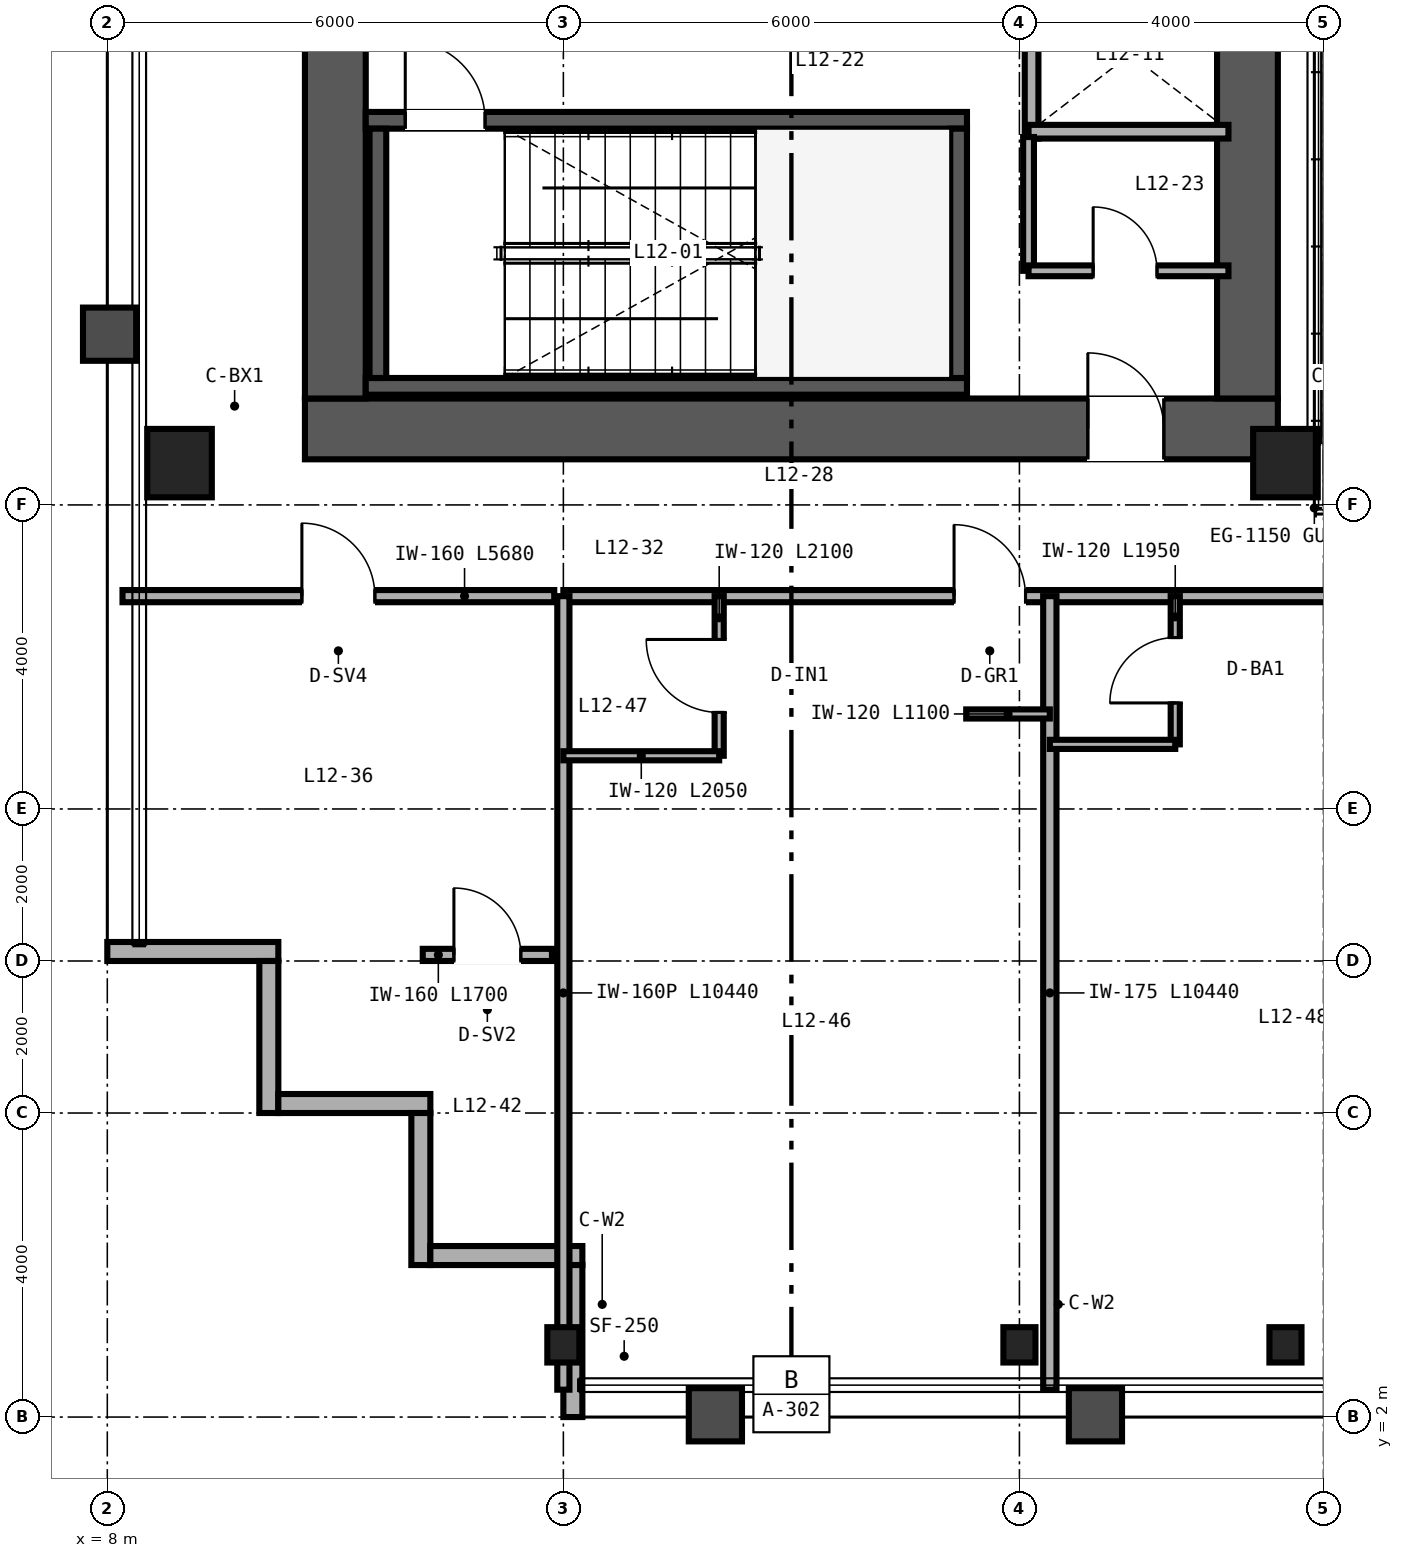
"""IFC4 building model, lengths in metres.
Left out: names, types, materials, properties, quantities, classifications, styles, units other than length and angle.
Written with IfcOpenShell. Run it as: python <this file> out.ifc"""

import sys

from ifc_helpers import new_model, si_unit, direction, frame, frame_2d, origin, origin_2d, place, context, subcontext, project, spatial, rectangle, hollow_rectangle, i_section, extrude, source, transform, mapped, element, fill, save


model = new_model("IFC4")
c1 = context("Model", 3, precision=1e-05, world=origin(), true_north=direction((0.0, 1.0)))
c2 = subcontext(c1, "Body", "Model", "MODEL_VIEW")
j1 = project(units=[si_unit("LENGTHUNIT", "METRE"), si_unit("PLANEANGLEUNIT", "RADIAN")], contexts=[c1])
p1 = place(None, origin())
s1 = spatial("IfcSite", under=j1, at=p1, CompositionType="ELEMENT")
p2 = place(p1, origin())
s2 = spatial("IfcBuilding", under=s1, at=p2, CompositionType="ELEMENT")
p3 = place(p2, frame((0.0, 0.0, 52.8)))
s3 = spatial("IfcBuildingStorey", under=s2, at=p3, CompositionType="ELEMENT", Elevation=52.8)
p4 = place(p3, frame((10.6, 15.0, 0.0), z_axis=(0.0, 0.0, 1.0), x_axis=(1.0, 0.0, 0.0)))
e1 = element("IfcWall", 1, at=p4, inside=s3, PredefinedType="SHEAR", context=c2, shape_type="SweptSolid", body=[
    extrude(rectangle(XDim=12.8, YDim=0.8, at=frame_2d((6.4, 0.0))), origin(), (0.0, 0.0, 1.0), 3.35),
])
p5 = place(p4, frame((10.3, 0.0, 0.0)))
e2 = element("IfcOpeningElement", 2, at=p5, cuts=e1, PredefinedType="OPENING", context=c2, shape_type="SweptSolid", body=[
    extrude(rectangle(XDim=1.0, YDim=2.15, at=frame_2d((0.5, 1.075))), frame((0.0, 0.41, 0.0), z_axis=(0.0, -1.0, 0.0), x_axis=(1.0, 0.0, 0.0)), (0.0, 0.0, 1.0), 0.82),
])
for number, where, z_axis, x_axis in (
    (3, (11.0, 15.4, 0.0), (0.0, 0.0, 1.0), (0.0, 1.0, 0.0)),
    (4, (23.0, 15.4, 0.0), (0.0, 0.0, 1.0), (0.0, 1.0, 0.0)),
):
    element("IfcWall", number, at=place(p3, frame(where, z_axis=z_axis, x_axis=x_axis)), inside=s3, PredefinedType="SHEAR", context=c2, shape_type="SweptSolid", body=[
        extrude(rectangle(XDim=21.2, YDim=0.8, at=frame_2d((10.6, 0.0))), origin(), (0.0, 0.0, 1.0), 3.35),
    ])
p6 = place(p3, frame((11.4, 15.56, 0.0), z_axis=(0.0, 0.0, 1.0), x_axis=(1.0, 0.0, 0.0)))
e5 = element("IfcWall", 5, at=p6, inside=s3, PredefinedType="SHEAR", context=c2, shape_type="SweptSolid", body=[
    extrude(rectangle(XDim=7.91, YDim=0.22, at=frame_2d((3.955, 0.0))), origin(), (0.0, 0.0, 1.0), 3.4),
])
p7 = place(p3, frame((11.4, 19.06, 0.0), z_axis=(0.0, 0.0, 1.0), x_axis=(1.0, 0.0, 0.0)))
e6 = element("IfcWall", 6, at=p7, inside=s3, PredefinedType="SHEAR", context=c2, shape_type="SweptSolid", body=[
    extrude(rectangle(XDim=7.91, YDim=0.22, at=frame_2d((3.955, 0.0))), origin(), (0.0, 0.0, 1.0), 3.4),
])
p8 = place(p7, frame((0.52, 0.0, 0.0)))
e7 = element("IfcOpeningElement", 7, at=p8, cuts=e6, PredefinedType="OPENING", context=c2, shape_type="SweptSolid", body=[
    extrude(rectangle(XDim=1.05, YDim=2.15, at=frame_2d((0.525, 1.075))), frame((0.0, 0.12, 0.0), z_axis=(0.0, -1.0, 0.0), x_axis=(1.0, 0.0, 0.0)), (0.0, 0.0, 1.0), 0.24),
])
for number, where, z_axis, x_axis in (
    (8, (11.56, 15.67, 0.0), (0.0, 0.0, 1.0), (0.0, 1.0, 0.0)),
    (9, (19.2, 15.67, 0.0), (0.0, 0.0, 1.0), (0.0, 1.0, 0.0)),
):
    element("IfcWall", number, at=place(p3, frame(where, z_axis=z_axis, x_axis=x_axis)), inside=s3, PredefinedType="SHEAR", context=c2, shape_type="SweptSolid", body=[
        extrude(rectangle(XDim=3.28, YDim=0.22, at=frame_2d((1.64, 0.0))), origin(), (0.0, 0.0, 1.0), 3.4),
    ])
m1 = source(origin(), c2, "Body", "SweptSolid", [
    extrude(hollow_rectangle(XDim=0.85, YDim=0.9, WallThickness=0.04, at=origin_2d()), origin(), (0.0, 0.0, 1.0), 3.35),
])
for number, where, z_axis, x_axis in (
    (10, (8.95, 14.55, 0.0), (0.0, 0.0, 1.0), (1.0, 0.0, 0.0)),
    (11, (23.5, 14.55, 0.0), (0.0, 0.0, 1.0), (1.0, 0.0, 0.0)),
):
    element("IfcColumn", number, at=place(p3, frame(where, z_axis=z_axis, x_axis=x_axis)), inside=s3, PredefinedType="COLUMN", context=c2, shape_type="MappedRepresentation", body=[
        mapped(m1, transform((0.0, 0.0, 0.0), scale=1.0)),
    ])
m2 = source(origin(), c2, "Body", "SweptSolid", [
    extrude(i_section(OverallWidth=0.422, OverallDepth=0.465, WebThickness=0.045, FlangeThickness=0.073, FilletRadius=0.025, at=origin_2d()), origin(), (0.0, 0.0, 1.0), 3.35),
])
for number, where, z_axis, x_axis in (
    (12, (14.0, 2.95, 0.0), (0.0, 0.0, 1.0), (1.0, 0.0, 0.0)),
    (13, (20.0, 2.95, 0.0), (0.0, 0.0, 1.0), (1.0, 0.0, 0.0)),
    (14, (23.5, 2.95, 0.0), (0.0, 0.0, 1.0), (1.0, 0.0, 0.0)),
):
    element("IfcColumn", number, at=place(p3, frame(where, z_axis=z_axis, x_axis=x_axis)), inside=s3, PredefinedType="COLUMN", context=c2, shape_type="MappedRepresentation", body=[
        mapped(m2, transform((0.0, 0.0, 0.0), scale=1.0)),
    ])
p9 = place(p3, frame((8.0, 8.125, 0.0), z_axis=(0.0, 0.0, 1.0), x_axis=(1.0, 0.0, 0.0)))
e15 = element("IfcWall", 15, at=p9, inside=s3, PredefinedType="SOLIDWALL", context=c2, shape_type="SweptSolid", body=[
    extrude(rectangle(XDim=2.25, YDim=0.25, at=frame_2d((1.125, 0.0))), origin(), (0.0, 0.0, 1.0), 3.35),
])
for number, where, z_axis, x_axis in (
    (16, (10.125, 8.0, 0.0), (0.0, 0.0, 1.0), (0.0, -1.0, 0.0)),
    (17, (10.25, 6.125, 0.0), (0.0, 0.0, 1.0), (1.0, 0.0, 0.0)),
    (18, (12.125, 6.0, 0.0), (0.0, 0.0, 1.0), (0.0, -1.0, 0.0)),
    (19, (12.25, 4.125, 0.0), (0.0, 0.0, 1.0), (1.0, 0.0, 0.0)),
):
    element("IfcWall", number, at=place(p3, frame(where, z_axis=z_axis, x_axis=x_axis)), inside=s3, PredefinedType="SOLIDWALL", context=c2, shape_type="SweptSolid", body=[
        extrude(rectangle(XDim=2.0, YDim=0.25, at=frame_2d((1.0, 0.0))), origin(), (0.0, 0.0, 1.0), 3.35),
    ])
p10 = place(p3, frame((14.125, 4.0, 0.0), z_axis=(0.0, 0.0, 1.0), x_axis=(0.0, -1.0, 0.0)))
e20 = element("IfcWall", 20, at=p10, inside=s3, PredefinedType="SOLIDWALL", context=c2, shape_type="SweptSolid", body=[
    extrude(rectangle(XDim=2.0, YDim=0.25, at=frame_2d((1.0, 0.0))), origin(), (0.0, 0.0, 1.0), 2.657),
])
p11 = place(p3, frame((20.16, 18.82, 0.0), z_axis=(0.0, 0.0, 1.0), x_axis=(0.0, 1.0, 0.0)))
e21 = element("IfcWall", 21, at=p11, inside=s3, PredefinedType="SOLIDWALL", context=c2, shape_type="SweptSolid", body=[
    extrude(rectangle(XDim=6.32, YDim=0.18, at=frame_2d((3.16, 0.0))), origin(), (0.0, 0.0, 1.0), 2.36),
])
p12 = place(p3, frame((20.12, 18.91, 0.0), z_axis=(0.0, 0.0, 1.0), x_axis=(1.0, 0.0, 0.0)))
e22 = element("IfcWall", 22, at=p12, inside=s3, PredefinedType="SOLIDWALL", context=c2, shape_type="SweptSolid", body=[
    extrude(rectangle(XDim=2.63, YDim=0.18, at=frame_2d((1.315, 0.0))), origin(), (0.0, 0.0, 1.0), 3.35),
])
p13 = place(p3, frame((20.12, 17.08, 0.0), z_axis=(0.0, 0.0, 1.0), x_axis=(0.0, 1.0, 0.0)))
e23 = element("IfcWall", 23, at=p13, inside=s3, PredefinedType="PARTITIONING", context=c2, shape_type="SweptSolid", body=[
    extrude(rectangle(XDim=1.76, YDim=0.142, at=frame_2d((0.88, 0.0))), origin(), (0.0, 0.0, 1.0), 3.35),
])
p14 = place(p3, frame((20.12, 17.08, 0.0), z_axis=(0.0, 0.0, 1.0), x_axis=(1.0, 0.0, 0.0)))
e24 = element("IfcWall", 24, at=p14, inside=s3, PredefinedType="PARTITIONING", context=c2, shape_type="SweptSolid", body=[
    extrude(rectangle(XDim=2.63, YDim=0.142, at=frame_2d((1.315, 0.0))), origin(), (0.0, 0.0, 1.0), 3.35),
])
p15 = place(p14, frame((0.85, 0.0, 0.0)))
e25 = element("IfcOpeningElement", 25, at=p15, cuts=e24, PredefinedType="OPENING", context=c2, shape_type="SweptSolid", body=[
    extrude(rectangle(XDim=0.84, YDim=2.1, at=frame_2d((0.42, 1.05))), frame((0.0, 0.081, 0.0), z_axis=(0.0, -1.0, 0.0), x_axis=(1.0, 0.0, 0.0)), (0.0, 0.0, 1.0), 0.162),
])
p16 = place(p3, frame((8.2, 12.8, 0.0), z_axis=(0.0, 0.0, 1.0), x_axis=(1.0, 0.0, 0.0)))
e26 = element("IfcWall", 26, at=p16, inside=s3, PredefinedType="PARTITIONING", context=c2, shape_type="SweptSolid", body=[
    extrude(rectangle(XDim=5.68, YDim=0.16, at=frame_2d((2.84, 0.0))), origin(), (0.0, 0.0, 1.0), 3.35),
])
p17 = place(p16, frame((2.36, 0.0, 0.0)))
e27 = element("IfcOpeningElement", 27, at=p17, cuts=e26, PredefinedType="OPENING", context=c2, shape_type="SweptSolid", body=[
    extrude(rectangle(XDim=0.96, YDim=2.15, at=frame_2d((0.48, 1.075))), frame((0.0, 0.09, 0.0), z_axis=(0.0, -1.0, 0.0), x_axis=(1.0, 0.0, 0.0)), (0.0, 0.0, 1.0), 0.18),
])
p18 = place(p3, frame((12.15, 8.08, 0.0), z_axis=(0.0, 0.0, 1.0), x_axis=(1.0, 0.0, 0.0)))
e28 = element("IfcWall", 28, at=p18, inside=s3, PredefinedType="PARTITIONING", context=c2, shape_type="SweptSolid", body=[
    extrude(rectangle(XDim=1.7, YDim=0.16, at=frame_2d((0.85, 0.0))), origin(), (0.0, 0.0, 1.0), 3.35),
])
p19 = place(p18, frame((0.41, 0.0, 0.0)))
e29 = element("IfcOpeningElement", 29, at=p19, cuts=e28, PredefinedType="OPENING", context=c2, shape_type="SweptSolid", body=[
    extrude(rectangle(XDim=0.88, YDim=2.15, at=frame_2d((0.44, 1.075))), frame((0.0, 0.09, 0.0), z_axis=(0.0, -1.0, 0.0), x_axis=(1.0, 0.0, 0.0)), (0.0, 0.0, 1.0), 0.18),
])
p20 = place(p3, frame((14.0, 12.8, 0.0), z_axis=(0.0, 0.0, 1.0), x_axis=(1.0, 0.0, 0.0)))
e30 = element("IfcWall", 30, at=p20, inside=s3, PredefinedType="PARTITIONING", context=c2, shape_type="SweptSolid", body=[
    extrude(rectangle(XDim=36.0, YDim=0.16, at=frame_2d((18.0, 0.0))), origin(), (0.0, 0.0, 1.0), 2.571),
])
p21 = place(p20, frame((5.14, 0.0, 0.0)))
e31 = element("IfcOpeningElement", 31, at=p21, cuts=e30, PredefinedType="OPENING", context=c2, shape_type="SweptSolid", body=[
    extrude(rectangle(XDim=0.94, YDim=2.15, at=frame_2d((0.47, 1.075))), frame((0.0, 0.09, 0.0), z_axis=(0.0, -1.0, 0.0), x_axis=(1.0, 0.0, 0.0)), (0.0, 0.0, 1.0), 0.18),
])
p22 = place(p20, frame((11.34, 0.0, 0.0)))
e32 = element("IfcOpeningElement", 32, at=p22, cuts=e30, PredefinedType="OPENING", context=c2, shape_type="SweptSolid", body=[
    extrude(rectangle(XDim=0.94, YDim=2.15, at=frame_2d((0.47, 1.075))), frame((0.0, 0.09, 0.0), z_axis=(0.0, -1.0, 0.0), x_axis=(1.0, 0.0, 0.0)), (0.0, 0.0, 1.0), 0.18),
])
p23 = place(p20, frame((17.94, 0.0, 0.0)))
e33 = element("IfcOpeningElement", 33, at=p23, cuts=e30, PredefinedType="OPENING", context=c2, shape_type="SweptSolid", body=[
    extrude(rectangle(XDim=0.94, YDim=2.15, at=frame_2d((0.47, 1.075))), frame((0.0, 0.09, 0.0), z_axis=(0.0, -1.0, 0.0), x_axis=(1.0, 0.0, 0.0)), (0.0, 0.0, 1.0), 0.18),
])
p24 = place(p20, frame((21.82, 0.0, 0.0)))
e34 = element("IfcOpeningElement", 34, at=p24, cuts=e30, PredefinedType="OPENING", context=c2, shape_type="SweptSolid", body=[
    extrude(rectangle(XDim=0.96, YDim=2.15, at=frame_2d((0.48, 1.075))), frame((0.0, 0.09, 0.0), z_axis=(0.0, -1.0, 0.0), x_axis=(1.0, 0.0, 0.0)), (0.0, 0.0, 1.0), 0.18),
])
p25 = place(p20, frame((29.54, 0.0, 0.0)))
e35 = element("IfcOpeningElement", 35, at=p25, cuts=e30, PredefinedType="OPENING", context=c2, shape_type="SweptSolid", body=[
    extrude(rectangle(XDim=0.94, YDim=2.15, at=frame_2d((0.47, 1.075))), frame((0.0, 0.09, 0.0), z_axis=(0.0, -1.0, 0.0), x_axis=(1.0, 0.0, 0.0)), (0.0, 0.0, 1.0), 0.18),
])
p26 = place(p20, frame((32.92, 0.0, 0.0)))
e36 = element("IfcOpeningElement", 36, at=p26, cuts=e30, PredefinedType="OPENING", context=c2, shape_type="SweptSolid", body=[
    extrude(rectangle(XDim=0.96, YDim=2.15, at=frame_2d((0.48, 1.075))), frame((0.0, 0.09, 0.0), z_axis=(0.0, -1.0, 0.0), x_axis=(1.0, 0.0, 0.0)), (0.0, 0.0, 1.0), 0.18),
])
p27 = place(p3, frame((14.0, 2.36, 0.0), z_axis=(0.0, 0.0, 1.0), x_axis=(0.0, 1.0, 0.0)))
e37 = element("IfcWall", 37, at=p27, inside=s3, PredefinedType="PARTITIONING", context=c2, shape_type="SweptSolid", body=[
    extrude(rectangle(XDim=10.44, YDim=0.16, at=frame_2d((5.22, 0.0))), origin(), (0.0, 0.0, 1.0), 2.657),
])
p28 = place(p3, frame((20.4, 2.36, 0.0), z_axis=(0.0, 0.0, 1.0), x_axis=(0.0, 1.0, 0.0)))
e38 = element("IfcWall", 38, at=p28, inside=s3, PredefinedType="PARTITIONING", context=c2, shape_type="SweptSolid", body=[
    extrude(rectangle(XDim=10.44, YDim=0.175, at=frame_2d((5.22, 0.0))), origin(), (0.0, 0.0, 1.0), 2.813),
])
p29 = place(p3, frame((16.05, 10.7, 0.0), z_axis=(0.0, 0.0, 1.0), x_axis=(0.0, 1.0, 0.0)))
e39 = element("IfcWall", 39, at=p29, inside=s3, PredefinedType="PARTITIONING", context=c2, shape_type="SweptSolid", body=[
    extrude(rectangle(XDim=2.1, YDim=0.12, at=frame_2d((1.05, 0.0))), origin(), (0.0, 0.0, 1.0), 3.35),
])
p30 = place(p29, frame((0.57, 0.0, 0.0)))
e40 = element("IfcOpeningElement", 40, at=p30, cuts=e39, PredefinedType="OPENING", context=c2, shape_type="SweptSolid", body=[
    extrude(rectangle(XDim=0.96, YDim=2.15, at=frame_2d((0.48, 1.075))), frame((0.0, 0.07, 0.0), z_axis=(0.0, -1.0, 0.0), x_axis=(1.0, 0.0, 0.0)), (0.0, 0.0, 1.0), 0.14),
])
p31 = place(p3, frame((14.0, 10.7, 0.0), z_axis=(0.0, 0.0, 1.0), x_axis=(1.0, 0.0, 0.0)))
e41 = element("IfcWall", 41, at=p31, inside=s3, PredefinedType="PARTITIONING", context=c2, shape_type="SweptSolid", body=[
    extrude(rectangle(XDim=2.05, YDim=0.12, at=frame_2d((1.025, 0.0))), origin(), (0.0, 0.0, 1.0), 3.35),
])
p32 = place(p3, frame((19.3, 11.25, 0.0), z_axis=(0.0, 0.0, 1.0), x_axis=(1.0, 0.0, 0.0)))
e42 = element("IfcWall", 42, at=p32, inside=s3, PredefinedType="PARTITIONING", context=c2, shape_type="SweptSolid", body=[
    extrude(rectangle(XDim=1.1, YDim=0.12, at=frame_2d((0.55, 0.0))), origin(), (0.0, 0.0, 1.0), 3.35),
])
p33 = place(p3, frame((22.05, 10.85, 0.0), z_axis=(0.0, 0.0, 1.0), x_axis=(0.0, 1.0, 0.0)))
e43 = element("IfcWall", 43, at=p33, inside=s3, PredefinedType="PARTITIONING", context=c2, shape_type="SweptSolid", body=[
    extrude(rectangle(XDim=1.95, YDim=0.12, at=frame_2d((0.975, 0.0))), origin(), (0.0, 0.0, 1.0), 3.35),
])
p34 = place(p33, frame((0.545, 0.0, 0.0)))
e44 = element("IfcOpeningElement", 44, at=p34, cuts=e43, PredefinedType="OPENING", context=c2, shape_type="SweptSolid", body=[
    extrude(rectangle(XDim=0.86, YDim=2.1, at=frame_2d((0.43, 1.05))), frame((0.0, 0.07, 0.0), z_axis=(0.0, -1.0, 0.0), x_axis=(1.0, 0.0, 0.0)), (0.0, 0.0, 1.0), 0.14),
])
p35 = place(p3, frame((20.4, 10.85, 0.0), z_axis=(0.0, 0.0, 1.0), x_axis=(1.0, 0.0, 0.0)))
e45 = element("IfcWall", 45, at=p35, inside=s3, PredefinedType="PARTITIONING", context=c2, shape_type="SweptSolid", body=[
    extrude(rectangle(XDim=1.65, YDim=0.12, at=frame_2d((0.825, 0.0))), origin(), (0.0, 0.0, 1.0), 3.35),
])
m3 = source(origin(), c2, "Body", "SweptSolid", [
    extrude(rectangle(XDim=1.05, YDim=2.15, at=frame_2d((0.525, 1.075))), frame((0.0, 0.025, 0.0), z_axis=(0.0, -1.0, 0.0), x_axis=(1.0, 0.0, 0.0)), (0.0, 0.0, 1.0), 0.05),
])
p36 = place(p8, origin())
e46 = element("IfcDoor", 46, at=p36, inside=s3, OperationType="SINGLE_SWING_LEFT", PredefinedType="DOOR", context=c2, shape_type="MappedRepresentation", body=[
    mapped(m3, transform((0.0, 0.0, 0.0), scale=1.0)),
])
fill(e7, e46)
m4 = source(origin(), c2, "Body", "SweptSolid", [
    extrude(rectangle(XDim=0.84, YDim=2.1, at=frame_2d((0.42, 1.05))), frame((0.0, 0.025, 0.0), z_axis=(0.0, -1.0, 0.0), x_axis=(1.0, 0.0, 0.0)), (0.0, 0.0, 1.0), 0.05),
])
p37 = place(p15, origin())
e47 = element("IfcDoor", 47, at=p37, inside=s3, OperationType="SINGLE_SWING_LEFT", PredefinedType="DOOR", context=c2, shape_type="MappedRepresentation", body=[
    mapped(m4, transform((0.0, 0.0, 0.0), scale=1.0)),
])
fill(e25, e47)
m5 = source(origin(), c2, "Body", "SweptSolid", [
    extrude(rectangle(XDim=1.0, YDim=2.15, at=frame_2d((0.5, 1.075))), frame((0.0, 0.025, 0.0), z_axis=(0.0, -1.0, 0.0), x_axis=(1.0, 0.0, 0.0)), (0.0, 0.0, 1.0), 0.05),
])
p38 = place(p5, origin())
e48 = element("IfcDoor", 48, at=p38, inside=s3, OperationType="SINGLE_SWING_LEFT", PredefinedType="DOOR", context=c2, shape_type="MappedRepresentation", body=[
    mapped(m5, transform((0.0, 0.0, 0.0), scale=1.0)),
])
fill(e2, e48)
m6 = source(origin(), c2, "Body", "SweptSolid", [
    extrude(rectangle(XDim=0.96, YDim=2.15, at=frame_2d((0.48, 1.075))), frame((0.0, 0.025, 0.0), z_axis=(0.0, -1.0, 0.0), x_axis=(1.0, 0.0, 0.0)), (0.0, 0.0, 1.0), 0.05),
])
p39 = place(p17, origin())
e49 = element("IfcDoor", 49, at=p39, inside=s3, OperationType="SINGLE_SWING_LEFT", PredefinedType="DOOR", context=c2, shape_type="MappedRepresentation", body=[
    mapped(m6, transform((0.0, 0.0, 0.0), scale=1.0)),
])
fill(e27, e49)
m7 = source(origin(), c2, "Body", "SweptSolid", [
    extrude(rectangle(XDim=0.88, YDim=2.15, at=frame_2d((0.44, 1.075))), frame((0.0, 0.025, 0.0), z_axis=(0.0, -1.0, 0.0), x_axis=(1.0, 0.0, 0.0)), (0.0, 0.0, 1.0), 0.05),
])
p40 = place(p19, origin())
e50 = element("IfcDoor", 50, at=p40, inside=s3, OperationType="SINGLE_SWING_LEFT", PredefinedType="DOOR", context=c2, shape_type="MappedRepresentation", body=[
    mapped(m7, transform((0.0, 0.0, 0.0), scale=1.0)),
])
fill(e29, e50)
p41 = place(p30, origin())
e51 = element("IfcDoor", 51, at=p41, inside=s3, OperationType="SINGLE_SWING_RIGHT", PredefinedType="DOOR", context=c2, shape_type="MappedRepresentation", body=[
    mapped(m6, transform((0.0, 0.0, 0.0), scale=1.0)),
])
fill(e40, e51)
m8 = source(origin(), c2, "Body", "SweptSolid", [
    extrude(rectangle(XDim=0.86, YDim=2.1, at=frame_2d((0.43, 1.05))), frame((0.0, 0.025, 0.0), z_axis=(0.0, -1.0, 0.0), x_axis=(1.0, 0.0, 0.0)), (0.0, 0.0, 1.0), 0.05),
])
p42 = place(p34, origin())
e52 = element("IfcDoor", 52, at=p42, inside=s3, OperationType="SINGLE_SWING_LEFT", PredefinedType="DOOR", context=c2, shape_type="MappedRepresentation", body=[
    mapped(m8, transform((0.0, 0.0, 0.0), scale=1.0)),
])
fill(e44, e52)
m9 = source(origin(), c2, "Body", "SweptSolid", [
    extrude(rectangle(XDim=0.94, YDim=2.15, at=frame_2d((0.47, 1.075))), frame((0.0, 0.025, 0.0), z_axis=(0.0, -1.0, 0.0), x_axis=(1.0, 0.0, 0.0)), (0.0, 0.0, 1.0), 0.05),
])
p43 = place(p21, origin())
e53 = element("IfcDoor", 53, at=p43, inside=s3, OperationType="SINGLE_SWING_LEFT", PredefinedType="DOOR", context=c2, shape_type="MappedRepresentation", body=[
    mapped(m9, transform((0.0, 0.0, 0.0), scale=1.0)),
])
fill(e31, e53)
save(model, sys.argv[1])
